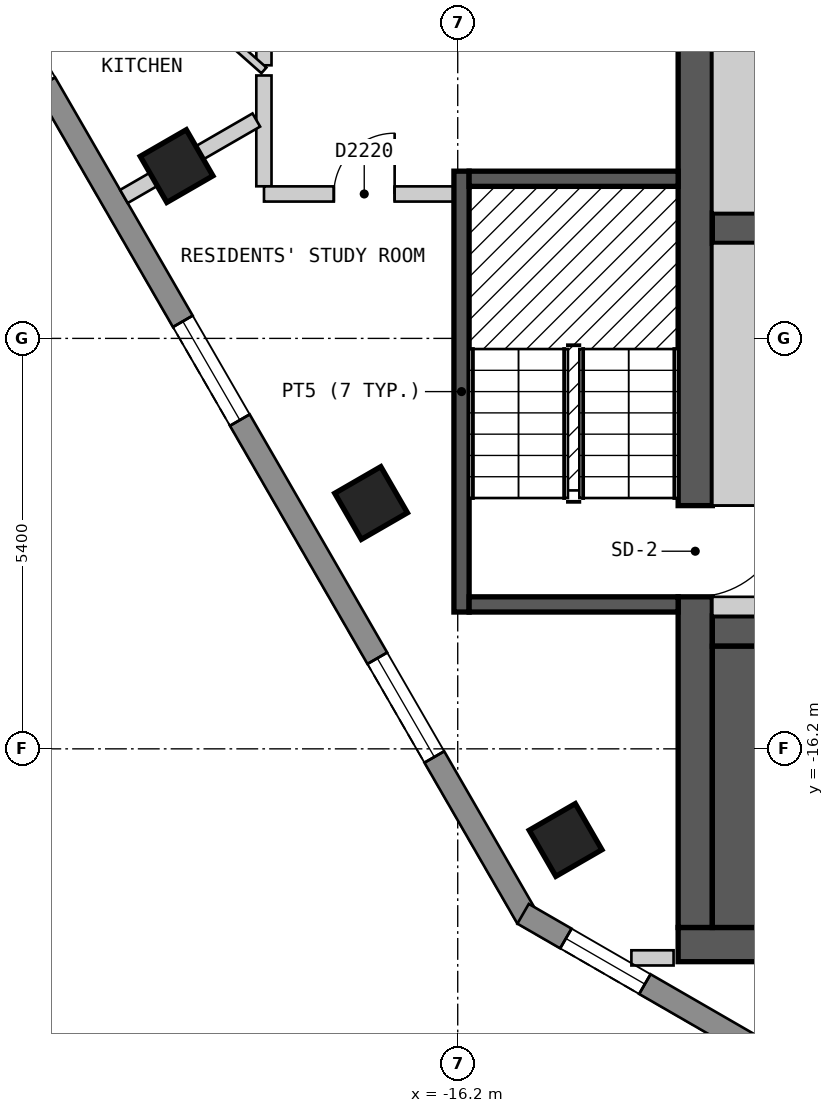
"""IFC4 building model, lengths in metres.
Left out: names, types, materials, properties, quantities, classifications, styles, units other than length and angle.
Written with IfcOpenShell. Run it as: python <this file> out.ifc"""

import sys

from ifc_helpers import new_model, si_unit, direction, frame, frame_2d, origin, origin_2d, place, context, subcontext, project, spatial, polyline, rectangle, outline, extrude, element, fill, save


model = new_model("IFC4")
c1 = context("Model", 3, precision=1e-05, world=origin(), true_north=direction((0.0, 1.0)))
c2 = subcontext(c1, "Body", "Model", "MODEL_VIEW")
j1 = project(units=[si_unit("LENGTHUNIT", "METRE"), si_unit("PLANEANGLEUNIT", "RADIAN")], contexts=[c1])
p1 = place(None, origin())
s1 = spatial("IfcSite", under=j1, at=p1, CompositionType="ELEMENT")
p2 = place(p1, origin())
s2 = spatial("IfcBuilding", under=s1, at=p2, CompositionType="ELEMENT")
p3 = place(p2, frame((0.0, 0.0, 229.8)))
s3 = spatial("IfcBuildingStorey", under=s2, at=p3, CompositionType="ELEMENT", Elevation=229.8)
for number, where, z_axis, x_axis in (
    (1, (-19.899, -8.533, 0.0), (0.0, 0.0, 1.0), (0.5, -0.866, 0.0)),
    (2, (-17.34, -12.966, 0.0), (0.0, 0.0, 1.0), (0.5, -0.866, 0.0)),
    (3, (-14.781, -17.399, 0.0), (0.0, 0.0, 1.0), (0.5, -0.866, 0.0)),
):
    element("IfcColumn", number, at=place(p3, frame(where, z_axis=z_axis, x_axis=x_axis)), inside=s3, PredefinedType="COLUMN", context=c2, shape_type="SweptSolid", body=[
        extrude(rectangle(XDim=0.7, YDim=0.7, at=origin_2d()), origin(), (0.0, 0.0, 1.0), 3.0),
    ])
p4 = place(p3, frame((-13.3, -18.775, 0.0), z_axis=(0.0, 0.0, 1.0), x_axis=(1.0, 0.0, 0.0)))
e4 = element("IfcWall", 4, at=p4, inside=s3, PredefinedType="SHEAR", context=c2, shape_type="SweptSolid", body=[
    extrude(rectangle(XDim=26.6, YDim=0.45, at=frame_2d((13.3, 0.0))), origin(), (0.0, 0.0, 1.0), 2.7),
])
p5 = place(p4, frame((9.8, 0.0, 0.0)))
e5 = element("IfcOpeningElement", 5, at=p5, cuts=e4, PredefinedType="OPENING", context=c2, shape_type="SweptSolid", body=[
    extrude(rectangle(XDim=0.9, YDim=2.1, at=frame_2d((0.45, 1.05))), frame((0.0, 0.235, 0.0), z_axis=(0.0, -1.0, 0.0), x_axis=(1.0, 0.0, 0.0)), (0.0, 0.0, 1.0), 0.47),
])
p6 = place(p3, frame((-13.075, -18.55, 0.0), z_axis=(0.0, 0.0, 1.0), x_axis=(0.0, 1.0, 0.0)))
e6 = element("IfcWall", 6, at=p6, inside=s3, PredefinedType="SHEAR", context=c2, shape_type="SweptSolid", body=[
    extrude(rectangle(XDim=13.1, YDim=0.45, at=frame_2d((6.55, 0.0))), origin(), (0.0, 0.0, 1.0), 2.7),
])
p7 = place(p6, frame((4.35, 0.0, 0.0)))
e7 = element("IfcOpeningElement", 7, at=p7, cuts=e6, PredefinedType="OPENING", context=c2, shape_type="SweptSolid", body=[
    extrude(rectangle(XDim=1.2, YDim=2.1, at=frame_2d((0.6, 1.05))), frame((0.0, 0.235, 0.0), z_axis=(0.0, -1.0, 0.0), x_axis=(1.0, 0.0, 0.0)), (0.0, 0.0, 1.0), 0.47),
])
p8 = place(p3, frame((-12.85, -14.65, 0.0), z_axis=(0.0, 0.0, 1.0), x_axis=(1.0, 0.0, 0.0)))
e8 = element("IfcWall", 8, at=p8, inside=s3, PredefinedType="SHEAR", context=c2, shape_type="SweptSolid", body=[
    extrude(rectangle(XDim=25.7, YDim=0.4, at=frame_2d((12.85, 0.0))), origin(), (0.0, 0.0, 1.0), 2.7),
])
p9 = place(p8, frame((2.05, 0.0, 0.0), z_axis=(0.0, 0.0, 1.0), x_axis=(-1.0, 0.0, 0.0)))
e9 = element("IfcOpeningElement", 9, at=p9, cuts=e8, PredefinedType="OPENING", context=c2, shape_type="SweptSolid", body=[
    extrude(rectangle(XDim=1.2, YDim=2.1, at=frame_2d((0.6, 1.05))), frame((0.0, 0.21, 0.0), z_axis=(0.0, -1.0, 0.0), x_axis=(1.0, 0.0, 0.0)), (0.0, 0.0, 1.0), 0.42),
])
p10 = place(p8, frame((24.9, 0.0, 0.0), z_axis=(0.0, 0.0, 1.0), x_axis=(-1.0, 0.0, 0.0)))
e10 = element("IfcOpeningElement", 10, at=p10, cuts=e8, PredefinedType="OPENING", context=c2, shape_type="SweptSolid", body=[
    extrude(rectangle(XDim=1.2, YDim=2.1, at=frame_2d((0.6, 1.05))), frame((0.0, 0.21, 0.0), z_axis=(0.0, -1.0, 0.0), x_axis=(1.0, 0.0, 0.0)), (0.0, 0.0, 1.0), 0.42),
])
p11 = place(p8, frame((7.95, 0.0, 0.0), z_axis=(0.0, 0.0, 1.0), x_axis=(-1.0, 0.0, 0.0)))
e11 = element("IfcOpeningElement", 11, at=p11, cuts=e8, PredefinedType="OPENING", context=c2, shape_type="SweptSolid", body=[
    extrude(rectangle(XDim=0.9, YDim=2.1, at=frame_2d((0.45, 1.05))), frame((0.0, 0.21, 0.0), z_axis=(0.0, -1.0, 0.0), x_axis=(1.0, 0.0, 0.0)), (0.0, 0.0, 1.0), 0.42),
])
p12 = place(p8, frame((10.0, 0.0, 0.0), z_axis=(0.0, 0.0, 1.0), x_axis=(-1.0, 0.0, 0.0)))
e12 = element("IfcOpeningElement", 12, at=p12, cuts=e8, PredefinedType="OPENING", context=c2, shape_type="SweptSolid", body=[
    extrude(rectangle(XDim=0.9, YDim=2.1, at=frame_2d((0.45, 1.05))), frame((0.0, 0.21, 0.0), z_axis=(0.0, -1.0, 0.0), x_axis=(1.0, 0.0, 0.0)), (0.0, 0.0, 1.0), 0.42),
])
p13 = place(p8, frame((12.3, 0.0, 0.0), z_axis=(0.0, 0.0, 1.0), x_axis=(-1.0, 0.0, 0.0)))
e13 = element("IfcOpeningElement", 13, at=p13, cuts=e8, PredefinedType="OPENING", context=c2, shape_type="SweptSolid", body=[
    extrude(rectangle(XDim=1.0, YDim=2.1, at=frame_2d((0.5, 1.05))), frame((0.0, 0.21, 0.0), z_axis=(0.0, -1.0, 0.0), x_axis=(1.0, 0.0, 0.0)), (0.0, 0.0, 1.0), 0.42),
])
p14 = place(p8, frame((14.5, 0.0, 0.0), z_axis=(0.0, 0.0, 1.0), x_axis=(-1.0, 0.0, 0.0)))
e14 = element("IfcOpeningElement", 14, at=p14, cuts=e8, PredefinedType="OPENING", context=c2, shape_type="SweptSolid", body=[
    extrude(rectangle(XDim=0.9, YDim=2.1, at=frame_2d((0.45, 1.05))), frame((0.0, 0.21, 0.0), z_axis=(0.0, -1.0, 0.0), x_axis=(1.0, 0.0, 0.0)), (0.0, 0.0, 1.0), 0.42),
])
p15 = place(p8, frame((16.5, 0.0, 0.0), z_axis=(0.0, 0.0, 1.0), x_axis=(-1.0, 0.0, 0.0)))
e15 = element("IfcOpeningElement", 15, at=p15, cuts=e8, PredefinedType="OPENING", context=c2, shape_type="SweptSolid", body=[
    extrude(rectangle(XDim=0.9, YDim=2.1, at=frame_2d((0.45, 1.05))), frame((0.0, 0.21, 0.0), z_axis=(0.0, -1.0, 0.0), x_axis=(1.0, 0.0, 0.0)), (0.0, 0.0, 1.0), 0.42),
])
p16 = place(p8, frame((18.65, 0.0, 0.0), z_axis=(0.0, 0.0, 1.0), x_axis=(-1.0, 0.0, 0.0)))
e16 = element("IfcOpeningElement", 16, at=p16, cuts=e8, PredefinedType="OPENING", context=c2, shape_type="SweptSolid", body=[
    extrude(rectangle(XDim=1.0, YDim=2.1, at=frame_2d((0.5, 1.05))), frame((0.0, 0.21, 0.0), z_axis=(0.0, -1.0, 0.0), x_axis=(1.0, 0.0, 0.0)), (0.0, 0.0, 1.0), 0.42),
])
p17 = place(p3, frame((-12.85, -9.35, 0.0), z_axis=(0.0, 0.0, 1.0), x_axis=(1.0, 0.0, 0.0)))
e17 = element("IfcWall", 17, at=p17, inside=s3, PredefinedType="SHEAR", context=c2, shape_type="SweptSolid", body=[
    extrude(rectangle(XDim=23.05, YDim=0.4, at=frame_2d((11.525, 0.0))), origin(), (0.0, 0.0, 1.0), 2.7),
])
p18 = place(p17, frame((1.45, 0.0, 0.0)))
e18 = element("IfcOpeningElement", 18, at=p18, cuts=e17, PredefinedType="OPENING", context=c2, shape_type="SweptSolid", body=[
    extrude(rectangle(XDim=1.1, YDim=2.1, at=frame_2d((0.55, 1.05))), frame((0.0, 0.21, 0.0), z_axis=(0.0, -1.0, 0.0), x_axis=(1.0, 0.0, 0.0)), (0.0, 0.0, 1.0), 0.42),
])
p19 = place(p17, frame((4.25, 0.0, 0.0)))
e19 = element("IfcOpeningElement", 19, at=p19, cuts=e17, PredefinedType="OPENING", context=c2, shape_type="SweptSolid", body=[
    extrude(rectangle(XDim=1.1, YDim=2.1, at=frame_2d((0.55, 1.05))), frame((0.0, 0.21, 0.0), z_axis=(0.0, -1.0, 0.0), x_axis=(1.0, 0.0, 0.0)), (0.0, 0.0, 1.0), 0.42),
])
p20 = place(p17, frame((7.05, 0.0, 0.0)))
e20 = element("IfcOpeningElement", 20, at=p20, cuts=e17, PredefinedType="OPENING", context=c2, shape_type="SweptSolid", body=[
    extrude(rectangle(XDim=1.1, YDim=2.1, at=frame_2d((0.55, 1.05))), frame((0.0, 0.21, 0.0), z_axis=(0.0, -1.0, 0.0), x_axis=(1.0, 0.0, 0.0)), (0.0, 0.0, 1.0), 0.42),
])
p21 = place(p17, frame((9.35, 0.0, 0.0)))
e21 = element("IfcOpeningElement", 21, at=p21, cuts=e17, PredefinedType="OPENING", context=c2, shape_type="SweptSolid", body=[
    extrude(rectangle(XDim=1.1, YDim=2.1, at=frame_2d((0.55, 1.05))), frame((0.0, 0.21, 0.0), z_axis=(0.0, -1.0, 0.0), x_axis=(1.0, 0.0, 0.0)), (0.0, 0.0, 1.0), 0.42),
])
p22 = place(p17, frame((11.65, 0.0, 0.0)))
e22 = element("IfcOpeningElement", 22, at=p22, cuts=e17, PredefinedType="OPENING", context=c2, shape_type="SweptSolid", body=[
    extrude(rectangle(XDim=1.1, YDim=2.1, at=frame_2d((0.55, 1.05))), frame((0.0, 0.21, 0.0), z_axis=(0.0, -1.0, 0.0), x_axis=(1.0, 0.0, 0.0)), (0.0, 0.0, 1.0), 0.42),
])
p23 = place(p17, frame((13.95, 0.0, 0.0)))
e23 = element("IfcOpeningElement", 23, at=p23, cuts=e17, PredefinedType="OPENING", context=c2, shape_type="SweptSolid", body=[
    extrude(rectangle(XDim=1.1, YDim=2.1, at=frame_2d((0.55, 1.05))), frame((0.0, 0.21, 0.0), z_axis=(0.0, -1.0, 0.0), x_axis=(1.0, 0.0, 0.0)), (0.0, 0.0, 1.0), 0.42),
])
p24 = place(p17, frame((16.25, 0.0, 0.0)))
e24 = element("IfcOpeningElement", 24, at=p24, cuts=e17, PredefinedType="OPENING", context=c2, shape_type="SweptSolid", body=[
    extrude(rectangle(XDim=1.1, YDim=2.1, at=frame_2d((0.55, 1.05))), frame((0.0, 0.21, 0.0), z_axis=(0.0, -1.0, 0.0), x_axis=(1.0, 0.0, 0.0)), (0.0, 0.0, 1.0), 0.42),
])
p25 = place(p17, frame((18.55, 0.0, 0.0)))
e25 = element("IfcOpeningElement", 25, at=p25, cuts=e17, PredefinedType="OPENING", context=c2, shape_type="SweptSolid", body=[
    extrude(rectangle(XDim=1.1, YDim=2.1, at=frame_2d((0.55, 1.05))), frame((0.0, 0.21, 0.0), z_axis=(0.0, -1.0, 0.0), x_axis=(1.0, 0.0, 0.0)), (0.0, 0.0, 1.0), 0.42),
])
p26 = place(p17, frame((20.95, 0.0, 0.0)))
e26 = element("IfcOpeningElement", 26, at=p26, cuts=e17, PredefinedType="OPENING", context=c2, shape_type="SweptSolid", body=[
    extrude(rectangle(XDim=1.1, YDim=2.1, at=frame_2d((0.55, 1.05))), frame((0.0, 0.21, 0.0), z_axis=(0.0, -1.0, 0.0), x_axis=(1.0, 0.0, 0.0)), (0.0, 0.0, 1.0), 0.42),
])
p27 = place(p3, frame((-23.599, -4.025, 0.0), z_axis=(0.0, 0.0, 1.0), x_axis=(0.500012653391, -0.866018098222, 0.0)))
e27 = element("IfcWall", 27, at=p27, inside=s3, PredefinedType="SOLIDWALL", context=c2, shape_type="SweptSolid", body=[
    extrude(outline(polyline([(0.0, -0.15), (16.628, -0.15), (16.548, 0.15), (0.08, 0.15), (0.0, -0.15)])), origin(), (0.0, 0.0, 1.0), 2.7),
])
p28 = place(p27, frame((2.444, 0.0, 0.15)))
e28 = element("IfcOpeningElement", 28, at=p28, cuts=e27, PredefinedType="OPENING", context=c2, shape_type="SweptSolid", body=[
    extrude(rectangle(XDim=1.5, YDim=2.1, at=frame_2d((0.75, 1.05))), frame((0.0, 0.16, 0.0), z_axis=(0.0, -1.0, 0.0), x_axis=(1.0, 0.0, 0.0)), (0.0, 0.0, 1.0), 0.32),
])
p29 = place(p27, frame((7.564, 0.0, 0.15)))
e29 = element("IfcOpeningElement", 29, at=p29, cuts=e27, PredefinedType="OPENING", context=c2, shape_type="SweptSolid", body=[
    extrude(rectangle(XDim=1.5, YDim=2.1, at=frame_2d((0.75, 1.05))), frame((0.0, 0.16, 0.0), z_axis=(0.0, -1.0, 0.0), x_axis=(1.0, 0.0, 0.0)), (0.0, 0.0, 1.0), 0.32),
])
p30 = place(p27, frame((12.682, 0.0, 0.15)))
e30 = element("IfcOpeningElement", 30, at=p30, cuts=e27, PredefinedType="OPENING", context=c2, shape_type="SweptSolid", body=[
    extrude(rectangle(XDim=1.5, YDim=2.1, at=frame_2d((0.75, 1.05))), frame((0.0, 0.16, 0.0), z_axis=(0.0, -1.0, 0.0), x_axis=(1.0, 0.0, 0.0)), (0.0, 0.0, 1.0), 0.32),
])
p31 = place(p3, frame((-15.34, -18.37, 0.0), z_axis=(0.0, 0.0, 1.0), x_axis=(0.866022959057, -0.500004234368, 0.0)))
e31 = element("IfcWall", 31, at=p31, inside=s3, PredefinedType="SOLIDWALL", context=c2, shape_type="SweptSolid", body=[
    extrude(outline(polyline([(0.0, -0.15), (5.0, -0.15), (4.92, 0.15), (0.08, 0.15), (0.0, -0.15)])), origin(), (0.0, 0.0, 1.0), 2.7),
])
p32 = place(p31, frame((0.65, 0.0, 0.15)))
e32 = element("IfcOpeningElement", 32, at=p32, cuts=e31, PredefinedType="OPENING", context=c2, shape_type="SweptSolid", body=[
    extrude(rectangle(XDim=1.2, YDim=2.1, at=frame_2d((0.6, 1.05))), frame((0.0, 0.16, 0.0), z_axis=(0.0, -1.0, 0.0), x_axis=(1.0, 0.0, 0.0)), (0.0, 0.0, 1.0), 0.32),
])
p33 = place(p3, frame((-18.75, -7.341, 0.0), z_axis=(0.0, 0.0, 1.0), x_axis=(0.0, -1.0, 0.0)))
e33 = element("IfcWall", 33, at=p33, inside=s3, PredefinedType="PARTITIONING", context=c2, shape_type="SweptSolid", body=[
    extrude(rectangle(XDim=1.458, YDim=0.2, at=frame_2d((0.729, 0.0))), origin(), (0.0, 0.0, 1.0), 2.7),
])
p34 = place(p3, frame((-18.749, -8.9, 0.0), z_axis=(0.0, 0.0, 1.0), x_axis=(1.0, 0.0, 0.0)))
e34 = element("IfcWall", 34, at=p34, inside=s3, PredefinedType="PARTITIONING", context=c2, shape_type="SweptSolid", body=[
    extrude(rectangle(XDim=2.699, YDim=0.2, at=frame_2d((1.35, 0.0))), origin(), (0.0, 0.0, 1.0), 2.7),
])
p35 = place(p34, frame((0.919, 0.0, 0.0)))
e35 = element("IfcOpeningElement", 35, at=p35, cuts=e34, PredefinedType="OPENING", context=c2, shape_type="SweptSolid", body=[
    extrude(rectangle(XDim=0.8, YDim=2.1, at=frame_2d((0.4, 1.05))), frame((0.0, 0.11, 0.0), z_axis=(0.0, -1.0, 0.0), x_axis=(1.0, 0.0, 0.0)), (0.0, 0.0, 1.0), 0.22),
])
p36 = place(p3, frame((-18.75, -7.207, 0.0), z_axis=(0.0, 0.0, 1.0), x_axis=(0.0, 1.0, 0.0)))
e36 = element("IfcWall", 36, at=p36, inside=s3, PredefinedType="PARTITIONING", context=c2, shape_type="SweptSolid", body=[
    extrude(rectangle(XDim=1.106, YDim=0.2, at=frame_2d((0.553, 0.0))), origin(), (0.0, 0.0, 1.0), 2.7),
])
p37 = place(p3, frame((-20.679, -5.565, 0.0), z_axis=(0.0, 0.0, 1.0), x_axis=(0.748495475416, -0.663139897217, 0.0)))
e37 = element("IfcWall", 37, at=p37, inside=s3, PredefinedType="PARTITIONING", context=c2, shape_type="SweptSolid", body=[
    extrude(rectangle(XDim=2.577, YDim=0.1, at=frame_2d((1.289, 0.0))), origin(), (0.0, 0.0, 1.0), 2.7),
])
p38 = place(p3, frame((-13.915, -18.95, 0.0), z_axis=(0.0, 0.0, 1.0), x_axis=(1.0, 0.0, 0.0)))
e38 = element("IfcWall", 38, at=p38, inside=s3, PredefinedType="PARTITIONING", context=c2, shape_type="SweptSolid", body=[
    extrude(rectangle(XDim=0.555, YDim=0.2, at=frame_2d((0.277, 0.0))), origin(), (0.0, 0.0, 1.0), 2.7),
])
p39 = place(p3, frame((-20.592, -8.933, 0.0), z_axis=(0.0, 0.0, 1.0), x_axis=(0.865941000796, 0.500146161777, 0.0)))
e39 = element("IfcWall", 39, at=p39, inside=s3, PredefinedType="PARTITIONING", context=c2, shape_type="SweptSolid", body=[
    extrude(rectangle(XDim=2.012, YDim=0.2, at=frame_2d((1.006, 0.0))), origin(), (0.0, 0.0, 1.0), 2.7),
])
p40 = place(p3, frame((-16.15, -14.4, 0.0), z_axis=(0.0, 0.0, 1.0), x_axis=(0.0, 1.0, 0.0)))
e40 = element("IfcWall", 40, at=p40, inside=s3, PredefinedType="SOLIDWALL", context=c2, shape_type="SweptSolid", body=[
    extrude(rectangle(XDim=5.8, YDim=0.2, at=frame_2d((2.9, 0.0))), origin(), (0.0, 0.0, 1.0), 2.7),
])
for number, where, z_axis, x_axis in (
    (41, (-16.05, -14.3, 0.0), (0.0, 0.0, 1.0), (1.0, 0.0, 0.0)),
    (42, (-16.05, -8.7, 0.0), (0.0, 0.0, 1.0), (1.0, 0.0, 0.0)),
):
    element("IfcWall", number, at=place(p3, frame(where, z_axis=z_axis, x_axis=x_axis)), inside=s3, PredefinedType="SOLIDWALL", context=c2, shape_type="SweptSolid", body=[
        extrude(rectangle(XDim=2.75, YDim=0.2, at=frame_2d((1.375, 0.0))), origin(), (0.0, 0.0, 1.0), 2.7),
    ])
p41 = place(p3, frame((-12.475, -18.55, 0.0), z_axis=(0.0, 0.0, 1.0), x_axis=(0.0, 1.0, 0.0)))
e43 = element("IfcWall", 43, at=p41, inside=s3, PredefinedType="SOLIDWALL", context=c2, shape_type="SweptSolid", body=[
    extrude(rectangle(XDim=3.7, YDim=0.75, at=frame_2d((1.85, 0.0))), origin(), (0.0, 0.0, 1.0), 2.7),
])
p42 = place(p3, frame((-12.85, -14.325, 0.0), z_axis=(0.0, 0.0, 1.0), x_axis=(1.0, 0.0, 0.0)))
e44 = element("IfcWall", 44, at=p42, inside=s3, PredefinedType="PARTITIONING", context=c2, shape_type="SweptSolid", body=[
    extrude(rectangle(XDim=0.75, YDim=0.25, at=frame_2d((0.375, 0.0))), origin(), (0.0, 0.0, 1.0), 2.7),
])
p43 = place(p3, frame((-12.475, -13.0, 0.0), z_axis=(0.0, 0.0, 1.0), x_axis=(0.0, 1.0, 0.0)))
e45 = element("IfcWall", 45, at=p43, inside=s3, PredefinedType="PARTITIONING", context=c2, shape_type="SweptSolid", body=[
    extrude(rectangle(XDim=3.45, YDim=0.75, at=frame_2d((1.725, 0.0))), origin(), (0.0, 0.0, 1.0), 2.7),
])
p44 = place(p3, frame((-12.475, -9.15, 0.0), z_axis=(0.0, 0.0, 1.0), x_axis=(0.0, 1.0, 0.0)))
e46 = element("IfcWall", 46, at=p44, inside=s3, PredefinedType="SOLIDWALL", context=c2, shape_type="SweptSolid", body=[
    extrude(rectangle(XDim=3.7, YDim=0.75, at=frame_2d((1.85, 0.0))), origin(), (0.0, 0.0, 1.0), 2.7),
])
p45 = place(p29, origin())
e47 = element("IfcWindow", 47, at=p45, inside=s3, PartitioningType="SINGLE_PANEL", PredefinedType="WINDOW", context=c2, shape_type="SweptSolid", body=[
    extrude(rectangle(XDim=1.5, YDim=2.1, at=frame_2d((0.75, 1.05))), frame((0.0, 0.03, 0.0), z_axis=(0.0, -1.0, 0.0), x_axis=(1.0, 0.0, 0.0)), (0.0, 0.0, 1.0), 0.06),
])
fill(e29, e47)
p46 = place(p30, origin())
e48 = element("IfcWindow", 48, at=p46, inside=s3, PartitioningType="SINGLE_PANEL", PredefinedType="WINDOW", context=c2, shape_type="SweptSolid", body=[
    extrude(rectangle(XDim=1.5, YDim=2.1, at=frame_2d((0.75, 1.05))), frame((0.0, 0.03, 0.0), z_axis=(0.0, -1.0, 0.0), x_axis=(1.0, 0.0, 0.0)), (0.0, 0.0, 1.0), 0.06),
])
fill(e30, e48)
p47 = place(p32, origin())
e49 = element("IfcWindow", 49, at=p47, inside=s3, PartitioningType="SINGLE_PANEL", PredefinedType="WINDOW", context=c2, shape_type="SweptSolid", body=[
    extrude(rectangle(XDim=1.2, YDim=2.1, at=frame_2d((0.6, 1.05))), frame((0.0, 0.03, 0.0), z_axis=(0.0, -1.0, 0.0), x_axis=(1.0, 0.0, 0.0)), (0.0, 0.0, 1.0), 0.06),
])
fill(e32, e49)
p48 = place(p35, origin())
e50 = element("IfcDoor", 50, at=p48, inside=s3, OperationType="SINGLE_SWING_RIGHT", PredefinedType="DOOR", context=c2, shape_type="SweptSolid", body=[
    extrude(rectangle(XDim=0.8, YDim=2.1, at=frame_2d((0.4, 1.05))), frame((0.0, 0.025, 0.0), z_axis=(0.0, -1.0, 0.0), x_axis=(1.0, 0.0, 0.0)), (0.0, 0.0, 1.0), 0.05),
])
fill(e35, e50)
p49 = place(p7, origin())
e51 = element("IfcDoor", 51, at=p49, inside=s3, OperationType="SINGLE_SWING_RIGHT", PredefinedType="DOOR", context=c2, shape_type="SweptSolid", body=[
    extrude(rectangle(XDim=1.2, YDim=2.1, at=frame_2d((0.6, 1.05))), frame((0.0, 0.025, 0.0), z_axis=(0.0, -1.0, 0.0), x_axis=(1.0, 0.0, 0.0)), (0.0, 0.0, 1.0), 0.05),
])
fill(e7, e51)
save(model, sys.argv[1])
